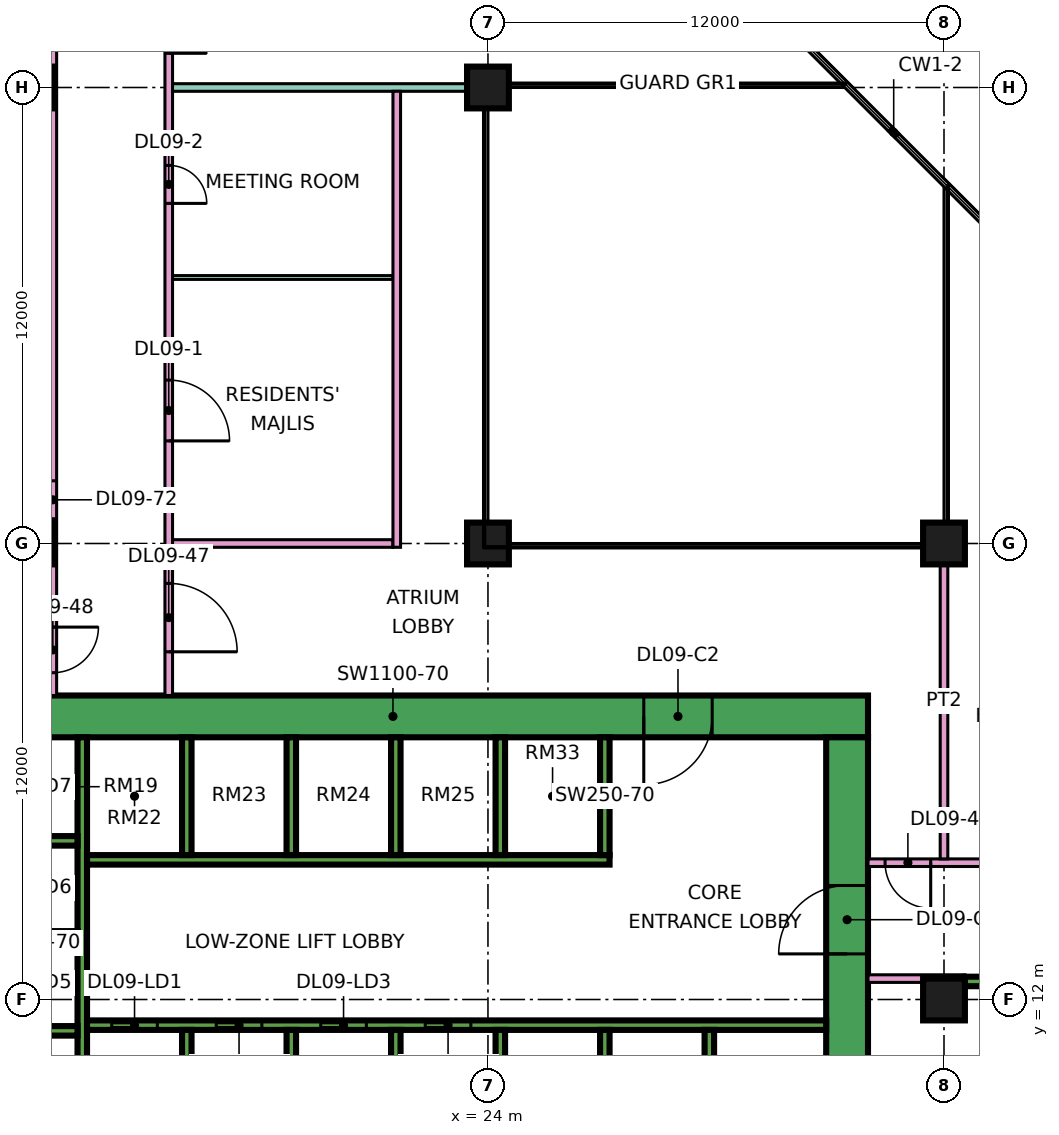
"""IFC4 building model, lengths in metres.
Left out: names, types, materials, properties, quantities, classifications, styles, units other than length and angle.
Written with IfcOpenShell. Run it as: python <this file> out.ifc"""

import sys

from ifc_helpers import new_model, si_unit, direction, frame, frame_2d, origin, origin_2d, place, context, subcontext, project, spatial, rectangle, extrude, element, fill, save


model = new_model("IFC4")
c1 = context("Model", 3, precision=1e-05, world=origin(), true_north=direction((0.0, 1.0)))
c2 = subcontext(c1, "Body", "Model", "MODEL_VIEW")
j1 = project(units=[si_unit("LENGTHUNIT", "METRE"), si_unit("PLANEANGLEUNIT", "RADIAN")], contexts=[c1])
p1 = place(None, origin())
s1 = spatial("IfcSite", under=j1, at=p1, CompositionType="ELEMENT")
p2 = place(p1, origin())
s2 = spatial("IfcBuilding", under=s1, at=p2, CompositionType="ELEMENT")
p3 = place(p2, frame((0.0, 0.0, 48.9)))
s3 = spatial("IfcBuildingStorey", under=s2, at=p3, CompositionType="ELEMENT", Elevation=48.9)
for number, where, z_axis, x_axis in (
    (1, (12.0, 24.0, 0.0), (0.0, 0.0, 1.0), (1.0, 0.0, 0.0)),
    (2, (12.0, 36.0, 0.0), (0.0, 0.0, 1.0), (1.0, 0.0, 0.0)),
    (3, (24.0, 24.0, 0.0), (0.0, 0.0, 1.0), (1.0, 0.0, 0.0)),
    (4, (24.0, 36.0, 0.0), (0.0, 0.0, 1.0), (1.0, 0.0, 0.0)),
    (5, (36.0, 12.0, 0.0), (0.0, 0.0, 1.0), (1.0, 0.0, 0.0)),
    (6, (36.0, 24.0, 0.0), (0.0, 0.0, 1.0), (1.0, 0.0, 0.0)),
):
    element("IfcColumn", number, at=place(p3, frame(where, z_axis=z_axis, x_axis=x_axis)), inside=s3, PredefinedType="COLUMN", context=c2, shape_type="SweptSolid", body=[
        extrude(rectangle(XDim=1.1, YDim=1.1, at=origin_2d()), origin(), (0.0, 0.0, 1.0), 3.75),
    ])
p4 = place(p3, frame((9.0, 19.45, 0.0), z_axis=(0.0, 0.0, 1.0), x_axis=(1.0, 0.0, 0.0)))
e7 = element("IfcWall", 7, at=p4, inside=s3, PredefinedType="SHEAR", context=c2, shape_type="SweptSolid", body=[
    extrude(rectangle(XDim=25.0, YDim=1.1, at=frame_2d((12.5, 0.0))), origin(), (0.0, 0.0, 1.0), 3.75),
])
p5 = place(p4, frame((19.1, 0.0, 0.0)))
e8 = element("IfcOpeningElement", 8, at=p5, cuts=e7, PredefinedType="OPENING", context=c2, shape_type="SweptSolid", body=[
    extrude(rectangle(XDim=1.8, YDim=2.4, at=frame_2d((0.9, 1.2))), frame((0.0, 0.56, 0.0), z_axis=(0.0, -1.0, 0.0), x_axis=(1.0, 0.0, 0.0)), (0.0, 0.0, 1.0), 1.12),
])
p6 = place(p3, frame((33.45, 8.1, 0.0), z_axis=(0.0, 0.0, 1.0), x_axis=(0.0, 1.0, 0.0)))
e9 = element("IfcWall", 9, at=p6, inside=s3, PredefinedType="SHEAR", context=c2, shape_type="SweptSolid", body=[
    extrude(rectangle(XDim=10.8, YDim=1.1, at=frame_2d((5.4, 0.0))), origin(), (0.0, 0.0, 1.0), 3.75),
])
p7 = place(p6, frame((5.1, 0.0, 0.0)))
e10 = element("IfcOpeningElement", 10, at=p7, cuts=e9, PredefinedType="OPENING", context=c2, shape_type="SweptSolid", body=[
    extrude(rectangle(XDim=1.8, YDim=2.4, at=frame_2d((0.9, 1.2))), frame((0.0, 0.56, 0.0), z_axis=(0.0, -1.0, 0.0), x_axis=(1.0, 0.0, 0.0)), (0.0, 0.0, 1.0), 1.12),
])
p8 = place(p3, frame((13.325, 8.1, 0.0), z_axis=(0.0, 0.0, 1.0), x_axis=(0.0, 1.0, 0.0)))
e11 = element("IfcWall", 11, at=p8, inside=s3, PredefinedType="SHEAR", context=c2, shape_type="SweptSolid", body=[
    extrude(rectangle(XDim=10.8, YDim=0.25, at=frame_2d((5.4, 0.0))), origin(), (0.0, 0.0, 1.0), 3.75),
])
p9 = place(p3, frame((13.45, 11.325, 0.0), z_axis=(0.0, 0.0, 1.0), x_axis=(1.0, 0.0, 0.0)))
e12 = element("IfcWall", 12, at=p9, inside=s3, PredefinedType="SHEAR", context=c2, shape_type="SweptSolid", body=[
    extrude(rectangle(XDim=19.45, YDim=0.25, at=frame_2d((9.725, 0.0))), origin(), (0.0, 0.0, 1.0), 3.75),
])
p10 = place(p9, frame((0.65, 0.0, 0.0)))
e13 = element("IfcOpeningElement", 13, at=p10, cuts=e12, PredefinedType="OPENING", context=c2, shape_type="SweptSolid", body=[
    extrude(rectangle(XDim=1.2, YDim=2.2, at=frame_2d((0.6, 1.1))), frame((0.0, 0.135, 0.0), z_axis=(0.0, -1.0, 0.0), x_axis=(1.0, 0.0, 0.0)), (0.0, 0.0, 1.0), 0.27),
])
p11 = place(p9, frame((3.4, 0.0, 0.0)))
e14 = element("IfcOpeningElement", 14, at=p11, cuts=e12, PredefinedType="OPENING", context=c2, shape_type="SweptSolid", body=[
    extrude(rectangle(XDim=1.2, YDim=2.2, at=frame_2d((0.6, 1.1))), frame((0.0, 0.135, 0.0), z_axis=(0.0, -1.0, 0.0), x_axis=(1.0, 0.0, 0.0)), (0.0, 0.0, 1.0), 0.27),
])
p12 = place(p9, frame((6.15, 0.0, 0.0)))
e15 = element("IfcOpeningElement", 15, at=p12, cuts=e12, PredefinedType="OPENING", context=c2, shape_type="SweptSolid", body=[
    extrude(rectangle(XDim=1.2, YDim=2.2, at=frame_2d((0.6, 1.1))), frame((0.0, 0.135, 0.0), z_axis=(0.0, -1.0, 0.0), x_axis=(1.0, 0.0, 0.0)), (0.0, 0.0, 1.0), 0.27),
])
p13 = place(p9, frame((8.9, 0.0, 0.0)))
e16 = element("IfcOpeningElement", 16, at=p13, cuts=e12, PredefinedType="OPENING", context=c2, shape_type="SweptSolid", body=[
    extrude(rectangle(XDim=1.2, YDim=2.2, at=frame_2d((0.6, 1.1))), frame((0.0, 0.135, 0.0), z_axis=(0.0, -1.0, 0.0), x_axis=(1.0, 0.0, 0.0)), (0.0, 0.0, 1.0), 0.27),
])
p14 = place(p3, frame((13.45, 15.675, 0.0), z_axis=(0.0, 0.0, 1.0), x_axis=(1.0, 0.0, 0.0)))
e17 = element("IfcWall", 17, at=p14, inside=s3, PredefinedType="SHEAR", context=c2, shape_type="SweptSolid", body=[
    extrude(rectangle(XDim=13.75, YDim=0.25, at=frame_2d((6.875, 0.0))), origin(), (0.0, 0.0, 1.0), 3.75),
])
for number, where, z_axis, x_axis in (
    (18, (10.2, 11.175, 0.0), (0.0, 0.0, 1.0), (1.0, 0.0, 0.0)),
    (19, (10.2, 13.675, 0.0), (0.0, 0.0, 1.0), (1.0, 0.0, 0.0)),
    (20, (10.2, 16.175, 0.0), (0.0, 0.0, 1.0), (1.0, 0.0, 0.0)),
):
    element("IfcWall", number, at=place(p3, frame(where, z_axis=z_axis, x_axis=x_axis)), inside=s3, PredefinedType="SHEAR", context=c2, shape_type="SweptSolid", body=[
        extrude(rectangle(XDim=3.0, YDim=0.25, at=frame_2d((1.5, 0.0))), origin(), (0.0, 0.0, 1.0), 3.75),
    ])
for number, where, z_axis, x_axis in (
    (21, (16.075, 8.1, 0.0), (0.0, 0.0, 1.0), (0.0, 1.0, 0.0)),
    (22, (18.825, 8.1, 0.0), (0.0, 0.0, 1.0), (0.0, 1.0, 0.0)),
    (23, (21.575, 8.1, 0.0), (0.0, 0.0, 1.0), (0.0, 1.0, 0.0)),
    (24, (24.325, 8.1, 0.0), (0.0, 0.0, 1.0), (0.0, 1.0, 0.0)),
    (25, (27.075, 8.1, 0.0), (0.0, 0.0, 1.0), (0.0, 1.0, 0.0)),
    (26, (29.825, 8.1, 0.0), (0.0, 0.0, 1.0), (0.0, 1.0, 0.0)),
    (27, (16.075, 15.8, 0.0), (0.0, 0.0, 1.0), (0.0, 1.0, 0.0)),
    (28, (18.825, 15.8, 0.0), (0.0, 0.0, 1.0), (0.0, 1.0, 0.0)),
    (29, (21.575, 15.8, 0.0), (0.0, 0.0, 1.0), (0.0, 1.0, 0.0)),
    (30, (24.325, 15.8, 0.0), (0.0, 0.0, 1.0), (0.0, 1.0, 0.0)),
    (31, (27.075, 15.8, 0.0), (0.0, 0.0, 1.0), (0.0, 1.0, 0.0)),
):
    element("IfcWall", number, at=place(p3, frame(where, z_axis=z_axis, x_axis=x_axis)), inside=s3, PredefinedType="SHEAR", context=c2, shape_type="SweptSolid", body=[
        extrude(rectangle(XDim=3.1, YDim=0.25, at=frame_2d((1.55, 0.0))), origin(), (0.0, 0.0, 1.0), 3.75),
    ])
p15 = place(p3, frame((36.55, 12.475, 0.0), z_axis=(0.0, 0.0, 1.0), x_axis=(1.0, 0.0, 0.0)))
e32 = element("IfcWall", 32, at=p15, inside=s3, PredefinedType="SHEAR", context=c2, shape_type="SweptSolid", body=[
    extrude(rectangle(XDim=4.1, YDim=0.25, at=frame_2d((2.05, 0.0))), origin(), (0.0, 0.0, 1.0), 3.75),
])
p16 = place(p15, frame((1.825, 0.0, 0.0)))
e33 = element("IfcOpeningElement", 33, at=p16, cuts=e32, PredefinedType="OPENING", context=c2, shape_type="SweptSolid", body=[
    extrude(rectangle(XDim=1.1, YDim=2.2, at=frame_2d((0.55, 1.1))), frame((0.0, 0.135, 0.0), z_axis=(0.0, -1.0, 0.0), x_axis=(1.0, 0.0, 0.0)), (0.0, 0.0, 1.0), 0.27),
])
p17 = place(p3, frame((-1.447, 12.553, 0.0), z_axis=(0.0, 0.0, 1.0), x_axis=(0.707106781187, -0.707106781187, 0.0)))
e34 = element("IfcWall", 34, at=p17, inside=s3, PredefinedType="SOLIDWALL", context=c2, shape_type="SweptSolid", body=[
    extrude(rectangle(XDim=19.799, YDim=0.15, at=frame_2d((9.899, 0.0))), origin(), (0.0, 0.0, 1.0), 3.35),
])
p18 = place(p17, frame((2.212, 0.0, 0.45)))
e35 = element("IfcOpeningElement", 35, at=p18, cuts=e34, PredefinedType="OPENING", context=c2, shape_type="SweptSolid", body=[
    extrude(rectangle(XDim=3.0, YDim=2.4, at=frame_2d((1.5, 1.2))), frame((0.0, 0.085, 0.0), z_axis=(0.0, -1.0, 0.0), x_axis=(1.0, 0.0, 0.0)), (0.0, 0.0, 1.0), 0.17),
])
p19 = place(p17, frame((10.216, 0.0, 0.45)))
e36 = element("IfcOpeningElement", 36, at=p19, cuts=e34, PredefinedType="OPENING", context=c2, shape_type="SweptSolid", body=[
    extrude(rectangle(XDim=3.0, YDim=2.4, at=frame_2d((1.5, 1.2))), frame((0.0, 0.085, 0.0), z_axis=(0.0, -1.0, 0.0), x_axis=(1.0, 0.0, 0.0)), (0.0, 0.0, 1.0), 0.17),
])
p20 = place(p3, frame((12.55, 20.0, 0.0), z_axis=(0.0, 0.0, 1.0), x_axis=(0.0, 1.0, 0.0)))
e37 = element("IfcWall", 37, at=p20, inside=s3, PredefinedType="PARTITIONING", context=c2, shape_type="SweptSolid", body=[
    extrude(rectangle(XDim=19.0, YDim=0.2, at=frame_2d((9.5, 0.0))), origin(), (0.0, 0.0, 1.0), 3.35),
])
p21 = place(p20, frame((0.6, 0.0, 0.0)))
e38 = element("IfcOpeningElement", 38, at=p21, cuts=e37, PredefinedType="OPENING", context=c2, shape_type="SweptSolid", body=[
    extrude(rectangle(XDim=1.2, YDim=2.1, at=frame_2d((0.6, 1.05))), frame((0.0, 0.11, 0.0), z_axis=(0.0, -1.0, 0.0), x_axis=(1.0, 0.0, 0.0)), (0.0, 0.0, 1.0), 0.22),
])
p22 = place(p20, frame((4.65, 0.0, 0.0)))
e39 = element("IfcOpeningElement", 39, at=p22, cuts=e37, PredefinedType="OPENING", context=c2, shape_type="SweptSolid", body=[
    extrude(rectangle(XDim=1.0, YDim=2.1, at=frame_2d((0.5, 1.05))), frame((0.0, 0.11, 0.0), z_axis=(0.0, -1.0, 0.0), x_axis=(1.0, 0.0, 0.0)), (0.0, 0.0, 1.0), 0.22),
])
p23 = place(p3, frame((15.6, 20.0, 0.0), z_axis=(0.0, 0.0, 1.0), x_axis=(0.0, 1.0, 0.0)))
e40 = element("IfcWall", 40, at=p23, inside=s3, PredefinedType="PARTITIONING", context=c2, shape_type="SweptSolid", body=[
    extrude(rectangle(XDim=27.775, YDim=0.2, at=frame_2d((13.887, 0.0))), origin(), (0.0, 0.0, 1.0), 3.35),
])
p24 = place(p23, frame((6.7, 0.0, 0.0)))
e41 = element("IfcOpeningElement", 41, at=p24, cuts=e40, PredefinedType="OPENING", context=c2, shape_type="SweptSolid", body=[
    extrude(rectangle(XDim=1.6, YDim=2.1, at=frame_2d((0.8, 1.05))), frame((0.0, 0.11, 0.0), z_axis=(0.0, -1.0, 0.0), x_axis=(1.0, 0.0, 0.0)), (0.0, 0.0, 1.0), 0.22),
])
p25 = place(p23, frame((12.95, 0.0, 0.0)))
e42 = element("IfcOpeningElement", 42, at=p25, cuts=e40, PredefinedType="OPENING", context=c2, shape_type="SweptSolid", body=[
    extrude(rectangle(XDim=1.0, YDim=2.1, at=frame_2d((0.5, 1.05))), frame((0.0, 0.11, 0.0), z_axis=(0.0, -1.0, 0.0), x_axis=(1.0, 0.0, 0.0)), (0.0, 0.0, 1.0), 0.22),
])
p26 = place(p23, frame((16.9, 0.0, 0.0)))
e43 = element("IfcOpeningElement", 43, at=p26, cuts=e40, PredefinedType="OPENING", context=c2, shape_type="SweptSolid", body=[
    extrude(rectangle(XDim=1.0, YDim=2.1, at=frame_2d((0.5, 1.05))), frame((0.0, 0.11, 0.0), z_axis=(0.0, -1.0, 0.0), x_axis=(1.0, 0.0, 0.0)), (0.0, 0.0, 1.0), 0.22),
])
p27 = place(p23, frame((1.15, 0.0, 0.0)))
e44 = element("IfcOpeningElement", 44, at=p27, cuts=e40, PredefinedType="OPENING", context=c2, shape_type="SweptSolid", body=[
    extrude(rectangle(XDim=1.8, YDim=2.1, at=frame_2d((0.9, 1.05))), frame((0.0, 0.11, 0.0), z_axis=(0.0, -1.0, 0.0), x_axis=(1.0, 0.0, 0.0)), (0.0, 0.0, 1.0), 0.22),
])
p28 = place(p23, frame((25.9, 0.0, 0.0)))
e45 = element("IfcOpeningElement", 45, at=p28, cuts=e40, PredefinedType="OPENING", context=c2, shape_type="SweptSolid", body=[
    extrude(rectangle(XDim=1.0, YDim=2.1, at=frame_2d((0.5, 1.05))), frame((0.0, 0.11, 0.0), z_axis=(0.0, -1.0, 0.0), x_axis=(1.0, 0.0, 0.0)), (0.0, 0.0, 1.0), 0.22),
])
p29 = place(p3, frame((15.7, 24.0, 0.0), z_axis=(0.0, 0.0, 1.0), x_axis=(1.0, 0.0, 0.0)))
e46 = element("IfcWall", 46, at=p29, inside=s3, PredefinedType="PARTITIONING", context=c2, shape_type="SweptSolid", body=[
    extrude(rectangle(XDim=5.8, YDim=0.2, at=frame_2d((2.9, 0.0))), origin(), (0.0, 0.0, 1.0), 3.35),
])
p30 = place(p3, frame((15.7, 31.0, 0.0), z_axis=(0.0, 0.0, 1.0), x_axis=(1.0, 0.0, 0.0)))
e47 = element("IfcWall", 47, at=p30, inside=s3, PredefinedType="PARTITIONING", context=c2, shape_type="SweptSolid", body=[
    extrude(rectangle(XDim=5.8, YDim=0.1, at=frame_2d((2.9, 0.0))), origin(), (0.0, 0.0, 1.0), 3.35),
])
p31 = place(p3, frame((15.7, 36.0, 0.0), z_axis=(0.0, 0.0, 1.0), x_axis=(1.0, 0.0, 0.0)))
e48 = element("IfcWall", 48, at=p31, inside=s3, PredefinedType="PARTITIONING", context=c2, shape_type="SweptSolid", body=[
    extrude(rectangle(XDim=8.3, YDim=0.2, at=frame_2d((4.15, 0.0))), origin(), (0.0, 0.0, 1.0), 3.35),
])
p32 = place(p3, frame((21.6, 23.9, 0.0), z_axis=(0.0, 0.0, 1.0), x_axis=(0.0, 1.0, 0.0)))
e49 = element("IfcWall", 49, at=p32, inside=s3, PredefinedType="PARTITIONING", context=c2, shape_type="SweptSolid", body=[
    extrude(rectangle(XDim=12.0, YDim=0.2, at=frame_2d((6.0, 0.0))), origin(), (0.0, 0.0, 1.0), 3.35),
])
p33 = place(p3, frame((34.0, 12.55, 0.0), z_axis=(0.0, 0.0, 1.0), x_axis=(1.0, 0.0, 0.0)))
e50 = element("IfcWall", 50, at=p33, inside=s3, PredefinedType="PARTITIONING", context=c2, shape_type="SweptSolid", body=[
    extrude(rectangle(XDim=2.551, YDim=0.2, at=frame_2d((1.275, 0.0))), origin(), (0.0, 0.0, 1.0), 3.35),
])
p34 = place(p3, frame((34.0, 15.6, 0.0), z_axis=(0.0, 0.0, 1.0), x_axis=(1.0, 0.0, 0.0)))
e51 = element("IfcWall", 51, at=p34, inside=s3, PredefinedType="PARTITIONING", context=c2, shape_type="SweptSolid", body=[
    extrude(rectangle(XDim=10.35, YDim=0.2, at=frame_2d((5.175, 0.0))), origin(), (0.0, 0.0, 1.0), 3.35),
])
p35 = place(p34, frame((5.6, 0.0, 0.0)))
e52 = element("IfcOpeningElement", 52, at=p35, cuts=e51, PredefinedType="OPENING", context=c2, shape_type="SweptSolid", body=[
    extrude(rectangle(XDim=1.0, YDim=2.1, at=frame_2d((0.5, 1.05))), frame((0.0, 0.11, 0.0), z_axis=(0.0, -1.0, 0.0), x_axis=(1.0, 0.0, 0.0)), (0.0, 0.0, 1.0), 0.22),
])
p36 = place(p34, frame((0.45, 0.0, 0.0)))
e53 = element("IfcOpeningElement", 53, at=p36, cuts=e51, PredefinedType="OPENING", context=c2, shape_type="SweptSolid", body=[
    extrude(rectangle(XDim=1.2, YDim=2.1, at=frame_2d((0.6, 1.05))), frame((0.0, 0.11, 0.0), z_axis=(0.0, -1.0, 0.0), x_axis=(1.0, 0.0, 0.0)), (0.0, 0.0, 1.0), 0.22),
])
p37 = place(p3, frame((36.0, 15.7, 0.0), z_axis=(0.0, 0.0, 1.0), x_axis=(0.0, 1.0, 0.0)))
e54 = element("IfcWall", 54, at=p37, inside=s3, PredefinedType="PARTITIONING", context=c2, shape_type="SweptSolid", body=[
    extrude(rectangle(XDim=8.3, YDim=0.2, at=frame_2d((4.15, 0.0))), origin(), (0.0, 0.0, 1.0), 3.35),
])
p38 = place(p10, origin())
e55 = element("IfcDoor", 55, at=p38, inside=s3, OperationType="DOUBLE_DOOR_SLIDING", PredefinedType="DOOR", context=c2, shape_type="SweptSolid", body=[
    extrude(rectangle(XDim=1.2, YDim=2.2, at=frame_2d((0.6, 1.1))), frame((0.0, 0.025, 0.0), z_axis=(0.0, -1.0, 0.0), x_axis=(1.0, 0.0, 0.0)), (0.0, 0.0, 1.0), 0.05),
])
fill(e13, e55)
p39 = place(p11, origin())
e56 = element("IfcDoor", 56, at=p39, inside=s3, OperationType="DOUBLE_DOOR_SLIDING", PredefinedType="DOOR", context=c2, shape_type="SweptSolid", body=[
    extrude(rectangle(XDim=1.2, YDim=2.2, at=frame_2d((0.6, 1.1))), frame((0.0, 0.025, 0.0), z_axis=(0.0, -1.0, 0.0), x_axis=(1.0, 0.0, 0.0)), (0.0, 0.0, 1.0), 0.05),
])
fill(e14, e56)
p40 = place(p12, origin())
e57 = element("IfcDoor", 57, at=p40, inside=s3, OperationType="DOUBLE_DOOR_SLIDING", PredefinedType="DOOR", context=c2, shape_type="SweptSolid", body=[
    extrude(rectangle(XDim=1.2, YDim=2.2, at=frame_2d((0.6, 1.1))), frame((0.0, 0.025, 0.0), z_axis=(0.0, -1.0, 0.0), x_axis=(1.0, 0.0, 0.0)), (0.0, 0.0, 1.0), 0.05),
])
fill(e15, e57)
p41 = place(p13, origin())
e58 = element("IfcDoor", 58, at=p41, inside=s3, OperationType="DOUBLE_DOOR_SLIDING", PredefinedType="DOOR", context=c2, shape_type="SweptSolid", body=[
    extrude(rectangle(XDim=1.2, YDim=2.2, at=frame_2d((0.6, 1.1))), frame((0.0, 0.025, 0.0), z_axis=(0.0, -1.0, 0.0), x_axis=(1.0, 0.0, 0.0)), (0.0, 0.0, 1.0), 0.05),
])
fill(e16, e58)
p42 = place(p7, origin())
e59 = element("IfcDoor", 59, at=p42, inside=s3, OperationType="DOUBLE_DOOR_SINGLE_SWING", PredefinedType="DOOR", context=c2, shape_type="SweptSolid", body=[
    extrude(rectangle(XDim=1.8, YDim=2.4, at=frame_2d((0.9, 1.2))), frame((0.0, 0.025, 0.0), z_axis=(0.0, -1.0, 0.0), x_axis=(1.0, 0.0, 0.0)), (0.0, 0.0, 1.0), 0.05),
])
fill(e10, e59)
p43 = place(p5, frame((1.8, 0.0, 0.0), z_axis=(0.0, 0.0, 1.0), x_axis=(-1.0, 0.0, 0.0)))
e60 = element("IfcDoor", 60, at=p43, inside=s3, OperationType="DOUBLE_DOOR_SINGLE_SWING", PredefinedType="DOOR", context=c2, shape_type="SweptSolid", body=[
    extrude(rectangle(XDim=1.8, YDim=2.4, at=frame_2d((0.9, 1.2))), frame((0.0, 0.025, 0.0), z_axis=(0.0, -1.0, 0.0), x_axis=(1.0, 0.0, 0.0)), (0.0, 0.0, 1.0), 0.05),
])
fill(e8, e60)
p44 = place(p24, frame((1.6, 0.0, 0.0), z_axis=(0.0, 0.0, 1.0), x_axis=(-1.0, 0.0, 0.0)))
e61 = element("IfcDoor", 61, at=p44, inside=s3, OperationType="DOUBLE_DOOR_SINGLE_SWING", PredefinedType="DOOR", context=c2, shape_type="SweptSolid", body=[
    extrude(rectangle(XDim=1.6, YDim=2.1, at=frame_2d((0.8, 1.05))), frame((0.0, 0.025, 0.0), z_axis=(0.0, -1.0, 0.0), x_axis=(1.0, 0.0, 0.0)), (0.0, 0.0, 1.0), 0.05),
])
fill(e41, e61)
p45 = place(p25, frame((1.0, 0.0, 0.0), z_axis=(0.0, 0.0, 1.0), x_axis=(-1.0, 0.0, 0.0)))
e62 = element("IfcDoor", 62, at=p45, inside=s3, OperationType="SINGLE_SWING_LEFT", PredefinedType="DOOR", context=c2, shape_type="SweptSolid", body=[
    extrude(rectangle(XDim=1.0, YDim=2.1, at=frame_2d((0.5, 1.05))), frame((0.0, 0.025, 0.0), z_axis=(0.0, -1.0, 0.0), x_axis=(1.0, 0.0, 0.0)), (0.0, 0.0, 1.0), 0.05),
])
fill(e42, e62)
p46 = place(p26, frame((1.0, 0.0, 0.0), z_axis=(0.0, 0.0, 1.0), x_axis=(-1.0, 0.0, 0.0)))
e63 = element("IfcDoor", 63, at=p46, inside=s3, OperationType="SINGLE_SWING_LEFT", PredefinedType="DOOR", context=c2, shape_type="SweptSolid", body=[
    extrude(rectangle(XDim=1.0, YDim=2.1, at=frame_2d((0.5, 1.05))), frame((0.0, 0.025, 0.0), z_axis=(0.0, -1.0, 0.0), x_axis=(1.0, 0.0, 0.0)), (0.0, 0.0, 1.0), 0.05),
])
fill(e43, e63)
p47 = place(p36, origin())
e64 = element("IfcDoor", 64, at=p47, inside=s3, OperationType="SINGLE_SWING_RIGHT", PredefinedType="DOOR", context=c2, shape_type="SweptSolid", body=[
    extrude(rectangle(XDim=1.2, YDim=2.1, at=frame_2d((0.6, 1.05))), frame((0.0, 0.025, 0.0), z_axis=(0.0, -1.0, 0.0), x_axis=(1.0, 0.0, 0.0)), (0.0, 0.0, 1.0), 0.05),
])
fill(e53, e64)
p48 = place(p27, frame((1.8, 0.0, 0.0), z_axis=(0.0, 0.0, 1.0), x_axis=(-1.0, 0.0, 0.0)))
e65 = element("IfcDoor", 65, at=p48, inside=s3, OperationType="DOUBLE_DOOR_SINGLE_SWING", PredefinedType="DOOR", context=c2, shape_type="SweptSolid", body=[
    extrude(rectangle(XDim=1.8, YDim=2.1, at=frame_2d((0.9, 1.05))), frame((0.0, 0.025, 0.0), z_axis=(0.0, -1.0, 0.0), x_axis=(1.0, 0.0, 0.0)), (0.0, 0.0, 1.0), 0.05),
])
fill(e44, e65)
p49 = place(p21, origin())
e66 = element("IfcDoor", 66, at=p49, inside=s3, OperationType="SINGLE_SWING_RIGHT", PredefinedType="DOOR", context=c2, shape_type="SweptSolid", body=[
    extrude(rectangle(XDim=1.2, YDim=2.1, at=frame_2d((0.6, 1.05))), frame((0.0, 0.025, 0.0), z_axis=(0.0, -1.0, 0.0), x_axis=(1.0, 0.0, 0.0)), (0.0, 0.0, 1.0), 0.05),
])
fill(e38, e66)
p50 = place(p22, origin())
e67 = element("IfcDoor", 67, at=p50, inside=s3, OperationType="SINGLE_SWING_LEFT", PredefinedType="DOOR", context=c2, shape_type="SweptSolid", body=[
    extrude(rectangle(XDim=1.0, YDim=2.1, at=frame_2d((0.5, 1.05))), frame((0.0, 0.025, 0.0), z_axis=(0.0, -1.0, 0.0), x_axis=(1.0, 0.0, 0.0)), (0.0, 0.0, 1.0), 0.05),
])
fill(e39, e67)
save(model, sys.argv[1])
